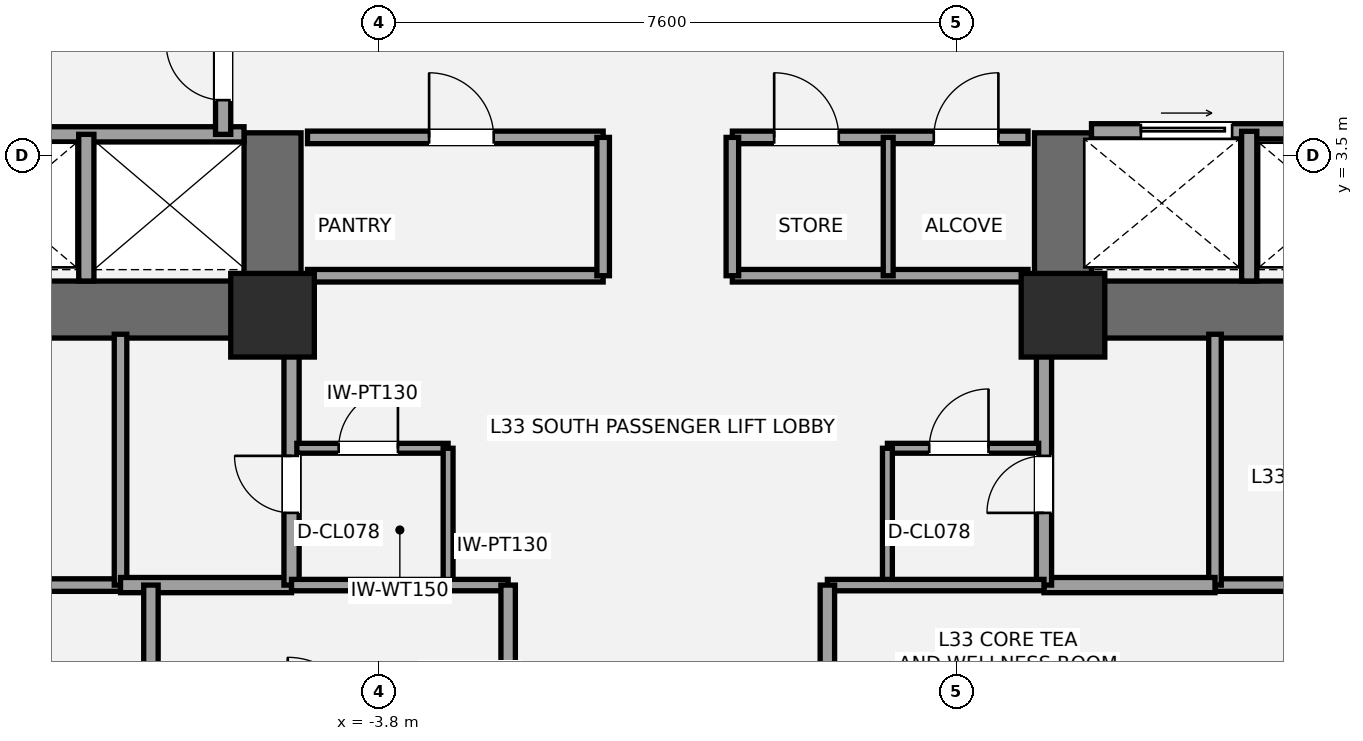
"""IFC4 building model, lengths in metres.
Left out: names, types, materials, properties, quantities, classifications, styles, units other than length and angle.
Written with IfcOpenShell. Run it as: python <this file> out.ifc"""

import sys

from ifc_helpers import new_model, si_unit, direction, frame, frame_2d, origin, origin_2d, place, context, subcontext, project, spatial, rectangle, extrude, element, fill, save


model = new_model("IFC4")
c1 = context("Model", 3, precision=1e-05, world=origin(), true_north=direction((0.0, 1.0)))
c2 = subcontext(c1, "Body", "Model", "MODEL_VIEW")
j1 = project(units=[si_unit("LENGTHUNIT", "METRE"), si_unit("PLANEANGLEUNIT", "RADIAN")], contexts=[c1])
p1 = place(None, origin())
s1 = spatial("IfcSite", under=j1, at=p1, CompositionType="ELEMENT")
p2 = place(p1, origin())
s2 = spatial("IfcBuilding", under=s1, at=p2, CompositionType="ELEMENT")
p3 = place(p2, frame((0.0, 0.0, 124.6)))
s3 = spatial("IfcBuildingStorey", under=s2, at=p3, CompositionType="ELEMENT", Elevation=124.6)
p4 = place(p3, frame((-4.825, 1.475, 0.0), z_axis=(0.0, 0.0, 1.0), x_axis=(-1.0, 0.0, 0.0)))
e1 = element("IfcWall", 1, at=p4, inside=s3, PredefinedType="SHEAR", context=c2, shape_type="SweptSolid", body=[
    extrude(rectangle(XDim=9.075, YDim=0.75, at=frame_2d((4.538, 0.0))), origin(), (0.0, 0.0, 1.0), 3.5),
])
p5 = place(p4, frame((5.475, 0.0, 0.0)))
e2 = element("IfcOpeningElement", 2, at=p5, cuts=e1, PredefinedType="OPENING", context=c2, shape_type="SweptSolid", body=[
    extrude(rectangle(XDim=1.05, YDim=2.15, at=frame_2d((0.525, 1.075))), frame((0.0, 0.385, 0.0), z_axis=(0.0, -1.0, 0.0), x_axis=(1.0, 0.0, 0.0)), (0.0, 0.0, 1.0), 0.77),
])
p6 = place(p4, frame((3.805, 0.0, 0.0)))
e3 = element("IfcOpeningElement", 3, at=p6, cuts=e1, PredefinedType="OPENING", context=c2, shape_type="SweptSolid", body=[
    extrude(rectangle(XDim=1.1, YDim=2.2, at=frame_2d((0.55, 1.1))), frame((0.0, 0.385, 0.0), z_axis=(0.0, -1.0, 0.0), x_axis=(1.0, 0.0, 0.0)), (0.0, 0.0, 1.0), 0.77),
])
p7 = place(p3, frame((-5.2, 1.1, 0.0), z_axis=(0.0, 0.0, 1.0), x_axis=(0.0, 1.0, 0.0)))
e4 = element("IfcWall", 4, at=p7, inside=s3, PredefinedType="SHEAR", context=c2, shape_type="SweptSolid", body=[
    extrude(rectangle(XDim=2.7, YDim=0.75, at=frame_2d((1.35, 0.0))), origin(), (0.0, 0.0, 1.0), 3.5),
])
p8 = place(p3, frame((13.9, 1.475, 0.0), z_axis=(0.0, 0.0, 1.0), x_axis=(-1.0, 0.0, 0.0)))
e5 = element("IfcWall", 5, at=p8, inside=s3, PredefinedType="SHEAR", context=c2, shape_type="SweptSolid", body=[
    extrude(rectangle(XDim=9.075, YDim=0.75, at=frame_2d((4.538, 0.0))), origin(), (0.0, 0.0, 1.0), 3.5),
])
p9 = place(p8, frame((2.55, 0.0, 0.0)))
e6 = element("IfcOpeningElement", 6, at=p9, cuts=e5, PredefinedType="OPENING", context=c2, shape_type="SweptSolid", body=[
    extrude(rectangle(XDim=1.05, YDim=2.15, at=frame_2d((0.525, 1.075))), frame((0.0, 0.385, 0.0), z_axis=(0.0, -1.0, 0.0), x_axis=(1.0, 0.0, 0.0)), (0.0, 0.0, 1.0), 0.77),
])
p10 = place(p8, frame((4.55, 0.0, 0.0)))
e7 = element("IfcOpeningElement", 7, at=p10, cuts=e5, PredefinedType="OPENING", context=c2, shape_type="SweptSolid", body=[
    extrude(rectangle(XDim=1.1, YDim=2.2, at=frame_2d((0.55, 1.1))), frame((0.0, 0.385, 0.0), z_axis=(0.0, -1.0, 0.0), x_axis=(1.0, 0.0, 0.0)), (0.0, 0.0, 1.0), 0.77),
])
p11 = place(p3, frame((5.2, 1.1, 0.0), z_axis=(0.0, 0.0, 1.0), x_axis=(0.0, 1.0, 0.0)))
e8 = element("IfcWall", 8, at=p11, inside=s3, PredefinedType="SHEAR", context=c2, shape_type="SweptSolid", body=[
    extrude(rectangle(XDim=2.7, YDim=0.75, at=frame_2d((1.35, 0.0))), origin(), (0.0, 0.0, 1.0), 3.5),
])
for number, where, z_axis, x_axis in (
    (9, (-5.2, 1.4, 0.0), (0.0, 0.0, 1.0), (1.0, 0.0, 0.0)),
    (10, (5.2, 1.4, 0.0), (0.0, 0.0, 1.0), (1.0, 0.0, 0.0)),
):
    element("IfcColumn", number, at=place(p3, frame(where, z_axis=z_axis, x_axis=x_axis)), inside=s3, PredefinedType="COLUMN", context=c2, shape_type="SweptSolid", body=[
        extrude(rectangle(XDim=1.1, YDim=1.1, at=origin_2d()), origin(), (0.0, 0.0, 1.0), 3.5),
    ])
p12 = place(p3, frame((-13.45, -2.15, 0.0), z_axis=(0.0, 0.0, 1.0), x_axis=(1.0, 0.0, 0.0)))
e11 = element("IfcWall", 11, at=p12, inside=s3, PredefinedType="PARTITIONING", context=c2, shape_type="SweptSolid", body=[
    extrude(rectangle(XDim=6.25, YDim=0.165, at=frame_2d((3.125, 0.0))), origin(), (0.0, 0.0, 1.0), 3.31),
])
p13 = place(p3, frame((-7.2, -2.15, 0.0), z_axis=(0.0, 0.0, 1.0), x_axis=(0.0, 1.0, 0.0)))
e12 = element("IfcWall", 12, at=p13, inside=s3, PredefinedType="PARTITIONING", context=c2, shape_type="SweptSolid", body=[
    extrude(rectangle(XDim=3.3, YDim=0.165, at=frame_2d((1.65, 0.0))), origin(), (0.0, 0.0, 1.0), 2.763),
])
p14 = place(p3, frame((-7.2, -2.15, 0.0), z_axis=(0.0, 0.0, 1.0), x_axis=(1.0, 0.0, 0.0)))
e13 = element("IfcWall", 13, at=p14, inside=s3, PredefinedType="SOLIDWALL", context=c2, shape_type="SweptSolid", body=[
    extrude(rectangle(XDim=2.25, YDim=0.2, at=frame_2d((1.125, 0.0))), origin(), (0.0, 0.0, 1.0), 2.763),
])
p15 = place(p3, frame((-4.95, -2.15, 0.0), z_axis=(0.0, 0.0, 1.0), x_axis=(0.0, 1.0, 0.0)))
e14 = element("IfcWall", 14, at=p15, inside=s3, PredefinedType="SOLIDWALL", context=c2, shape_type="SweptSolid", body=[
    extrude(rectangle(XDim=3.3, YDim=0.2, at=frame_2d((1.65, 0.0))), origin(), (0.0, 0.0, 1.0), 2.763),
])
p16 = place(p15, frame((0.95, 0.0, 0.0)))
e15 = element("IfcOpeningElement", 15, at=p16, cuts=e14, PredefinedType="OPENING", context=c2, shape_type="SweptSolid", body=[
    extrude(rectangle(XDim=0.75, YDim=2.1, at=frame_2d((0.375, 1.05))), frame((0.0, 0.11, 0.0), z_axis=(0.0, -1.0, 0.0), x_axis=(1.0, 0.0, 0.0)), (0.0, 0.0, 1.0), 0.22),
])
p17 = place(p3, frame((7.2, -2.15, 0.0), z_axis=(0.0, 0.0, 1.0), x_axis=(1.0, 0.0, 0.0)))
e16 = element("IfcWall", 16, at=p17, inside=s3, PredefinedType="PARTITIONING", context=c2, shape_type="SweptSolid", body=[
    extrude(rectangle(XDim=6.25, YDim=0.165, at=frame_2d((3.125, 0.0))), origin(), (0.0, 0.0, 1.0), 3.31),
])
p18 = place(p3, frame((7.2, -2.15, 0.0), z_axis=(0.0, 0.0, 1.0), x_axis=(0.0, 1.0, 0.0)))
e17 = element("IfcWall", 17, at=p18, inside=s3, PredefinedType="PARTITIONING", context=c2, shape_type="SweptSolid", body=[
    extrude(rectangle(XDim=3.3, YDim=0.165, at=frame_2d((1.65, 0.0))), origin(), (0.0, 0.0, 1.0), 2.763),
])
p19 = place(p3, frame((4.95, -2.15, 0.0), z_axis=(0.0, 0.0, 1.0), x_axis=(1.0, 0.0, 0.0)))
e18 = element("IfcWall", 18, at=p19, inside=s3, PredefinedType="SOLIDWALL", context=c2, shape_type="SweptSolid", body=[
    extrude(rectangle(XDim=2.25, YDim=0.2, at=frame_2d((1.125, 0.0))), origin(), (0.0, 0.0, 1.0), 3.31),
])
p20 = place(p3, frame((4.95, -2.15, 0.0), z_axis=(0.0, 0.0, 1.0), x_axis=(0.0, 1.0, 0.0)))
e19 = element("IfcWall", 19, at=p20, inside=s3, PredefinedType="SOLIDWALL", context=c2, shape_type="SweptSolid", body=[
    extrude(rectangle(XDim=3.3, YDim=0.2, at=frame_2d((1.65, 0.0))), origin(), (0.0, 0.0, 1.0), 2.763),
])
p21 = place(p20, frame((0.95, 0.0, 0.0)))
e20 = element("IfcOpeningElement", 20, at=p21, cuts=e19, PredefinedType="OPENING", context=c2, shape_type="SweptSolid", body=[
    extrude(rectangle(XDim=0.75, YDim=2.1, at=frame_2d((0.375, 1.05))), frame((0.0, 0.11, 0.0), z_axis=(0.0, -1.0, 0.0), x_axis=(1.0, 0.0, 0.0)), (0.0, 0.0, 1.0), 0.22),
])
p22 = place(p3, frame((-4.88, -0.35, 0.0), z_axis=(0.0, 0.0, 1.0), x_axis=(1.0, 0.0, 0.0)))
e21 = element("IfcWall", 21, at=p22, inside=s3, PredefinedType="PARTITIONING", context=c2, shape_type="SweptSolid", body=[
    extrude(rectangle(XDim=1.99, YDim=0.13, at=frame_2d((0.995, 0.0))), origin(), (0.0, 0.0, 1.0), 3.31),
])
p23 = place(p22, frame((0.55, 0.0, 0.0)))
e22 = element("IfcOpeningElement", 22, at=p23, cuts=e21, PredefinedType="OPENING", context=c2, shape_type="SweptSolid", body=[
    extrude(rectangle(XDim=0.78, YDim=2.1, at=frame_2d((0.39, 1.05))), frame((0.0, 0.075, 0.0), z_axis=(0.0, -1.0, 0.0), x_axis=(1.0, 0.0, 0.0)), (0.0, 0.0, 1.0), 0.15),
])
p24 = place(p3, frame((-2.89, -2.15, 0.0), z_axis=(0.0, 0.0, 1.0), x_axis=(0.0, 1.0, 0.0)))
e23 = element("IfcWall", 23, at=p24, inside=s3, PredefinedType="PARTITIONING", context=c2, shape_type="SweptSolid", body=[
    extrude(rectangle(XDim=1.8, YDim=0.13, at=frame_2d((0.9, 0.0))), origin(), (0.0, 0.0, 1.0), 2.763),
])
p25 = place(p3, frame((2.89, -0.35, 0.0), z_axis=(0.0, 0.0, 1.0), x_axis=(1.0, 0.0, 0.0)))
e24 = element("IfcWall", 24, at=p25, inside=s3, PredefinedType="PARTITIONING", context=c2, shape_type="SweptSolid", body=[
    extrude(rectangle(XDim=1.99, YDim=0.13, at=frame_2d((0.995, 0.0))), origin(), (0.0, 0.0, 1.0), 3.31),
])
p26 = place(p25, frame((0.55, 0.0, 0.0)))
e25 = element("IfcOpeningElement", 25, at=p26, cuts=e24, PredefinedType="OPENING", context=c2, shape_type="SweptSolid", body=[
    extrude(rectangle(XDim=0.78, YDim=2.1, at=frame_2d((0.39, 1.05))), frame((0.0, 0.075, 0.0), z_axis=(0.0, -1.0, 0.0), x_axis=(1.0, 0.0, 0.0)), (0.0, 0.0, 1.0), 0.15),
])
p27 = place(p3, frame((2.89, -2.15, 0.0), z_axis=(0.0, 0.0, 1.0), x_axis=(0.0, 1.0, 0.0)))
e26 = element("IfcWall", 26, at=p27, inside=s3, PredefinedType="PARTITIONING", context=c2, shape_type="SweptSolid", body=[
    extrude(rectangle(XDim=1.8, YDim=0.13, at=frame_2d((0.9, 0.0))), origin(), (0.0, 0.0, 1.0), 3.31),
])
p28 = place(p3, frame((-9.78, 3.78, 0.0), z_axis=(0.0, 0.0, 1.0), x_axis=(1.0, 0.0, 0.0)))
e27 = element("IfcWall", 27, at=p28, inside=s3, PredefinedType="SOLIDWALL", context=c2, shape_type="SweptSolid", body=[
    extrude(rectangle(XDim=4.205, YDim=0.2, at=frame_2d((2.103, 0.0))), origin(), (0.0, 0.0, 1.0), 3.31),
])
p29 = place(p3, frame((-7.65, 1.85, 0.0), z_axis=(0.0, 0.0, 1.0), x_axis=(0.0, 1.0, 0.0)))
e28 = element("IfcWall", 28, at=p29, inside=s3, PredefinedType="SOLIDWALL", context=c2, shape_type="SweptSolid", body=[
    extrude(rectangle(XDim=1.93, YDim=0.2, at=frame_2d((0.965, 0.0))), origin(), (0.0, 0.0, 1.0), 3.31),
])
p30 = place(p3, frame((-5.85, 3.78, 0.0), z_axis=(0.0, 0.0, 1.0), x_axis=(0.0, 1.0, 0.0)))
e29 = element("IfcWall", 29, at=p30, inside=s3, PredefinedType="SOLIDWALL", context=c2, shape_type="SweptSolid", body=[
    extrude(rectangle(XDim=1.69, YDim=0.2, at=frame_2d((0.845, 0.0))), origin(), (0.0, 0.0, 1.0), 3.31),
])
p31 = place(p30, frame((0.45, 0.0, 0.0)))
e30 = element("IfcOpeningElement", 30, at=p31, cuts=e29, PredefinedType="OPENING", context=c2, shape_type="SweptSolid", body=[
    extrude(rectangle(XDim=0.75, YDim=2.1, at=frame_2d((0.375, 1.05))), frame((0.0, 0.11, 0.0), z_axis=(0.0, -1.0, 0.0), x_axis=(1.0, 0.0, 0.0)), (0.0, 0.0, 1.0), 0.22),
])
p32 = place(p3, frame((5.575, 3.82, 0.0), z_axis=(0.0, 0.0, 1.0), x_axis=(1.0, 0.0, 0.0)))
e31 = element("IfcWall", 31, at=p32, inside=s3, PredefinedType="SOLIDWALL", context=c2, shape_type="SweptSolid", body=[
    extrude(rectangle(XDim=4.205, YDim=0.2, at=frame_2d((2.103, 0.0))), origin(), (0.0, 0.0, 1.0), 3.31),
])
p33 = place(p32, frame((0.65, 0.0, 0.0)))
e32 = element("IfcOpeningElement", 32, at=p33, cuts=e31, PredefinedType="OPENING", context=c2, shape_type="SweptSolid", body=[
    extrude(rectangle(XDim=1.2, YDim=2.2, at=frame_2d((0.6, 1.1))), frame((0.0, 0.11, 0.0), z_axis=(0.0, -1.0, 0.0), x_axis=(1.0, 0.0, 0.0)), (0.0, 0.0, 1.0), 0.22),
])
p34 = place(p3, frame((7.65, 1.85, 0.0), z_axis=(0.0, 0.0, 1.0), x_axis=(0.0, 1.0, 0.0)))
e33 = element("IfcWall", 33, at=p34, inside=s3, PredefinedType="SOLIDWALL", context=c2, shape_type="SweptSolid", body=[
    extrude(rectangle(XDim=1.97, YDim=0.2, at=frame_2d((0.985, 0.0))), origin(), (0.0, 0.0, 1.0), 3.31),
])
p35 = place(p3, frame((-4.74, 1.92, 0.0), z_axis=(0.0, 0.0, 1.0), x_axis=(1.0, 0.0, 0.0)))
e34 = element("IfcWall", 34, at=p35, inside=s3, PredefinedType="PARTITIONING", context=c2, shape_type="SweptSolid", body=[
    extrude(rectangle(XDim=3.89, YDim=0.165, at=frame_2d((1.945, 0.0))), origin(), (0.0, 0.0, 1.0), 2.3),
])
p36 = place(p3, frame((-4.74, 3.74, 0.0), z_axis=(0.0, 0.0, 1.0), x_axis=(1.0, 0.0, 0.0)))
e35 = element("IfcWall", 35, at=p36, inside=s3, PredefinedType="PARTITIONING", context=c2, shape_type="SweptSolid", body=[
    extrude(rectangle(XDim=3.89, YDim=0.165, at=frame_2d((1.945, 0.0))), origin(), (0.0, 0.0, 1.0), 3.31),
])
p37 = place(p36, frame((1.6, 0.0, 0.0)))
e36 = element("IfcOpeningElement", 36, at=p37, cuts=e35, PredefinedType="OPENING", context=c2, shape_type="SweptSolid", body=[
    extrude(rectangle(XDim=0.85, YDim=2.1, at=frame_2d((0.425, 1.05))), frame((0.0, 0.093, 0.0), z_axis=(0.0, -1.0, 0.0), x_axis=(1.0, 0.0, 0.0)), (0.0, 0.0, 1.0), 0.185),
])
p38 = place(p3, frame((-0.85, 1.92, 0.0), z_axis=(0.0, 0.0, 1.0), x_axis=(0.0, 1.0, 0.0)))
e37 = element("IfcWall", 37, at=p38, inside=s3, PredefinedType="PARTITIONING", context=c2, shape_type="SweptSolid", body=[
    extrude(rectangle(XDim=1.82, YDim=0.165, at=frame_2d((0.91, 0.0))), origin(), (0.0, 0.0, 1.0), 3.31),
])
p39 = place(p3, frame((0.85, 1.92, 0.0), z_axis=(0.0, 0.0, 1.0), x_axis=(1.0, 0.0, 0.0)))
e38 = element("IfcWall", 38, at=p39, inside=s3, PredefinedType="PARTITIONING", context=c2, shape_type="SweptSolid", body=[
    extrude(rectangle(XDim=3.89, YDim=0.165, at=frame_2d((1.945, 0.0))), origin(), (0.0, 0.0, 1.0), 2.3),
])
p40 = place(p3, frame((0.85, 3.74, 0.0), z_axis=(0.0, 0.0, 1.0), x_axis=(1.0, 0.0, 0.0)))
e39 = element("IfcWall", 39, at=p40, inside=s3, PredefinedType="PARTITIONING", context=c2, shape_type="SweptSolid", body=[
    extrude(rectangle(XDim=3.89, YDim=0.165, at=frame_2d((1.945, 0.0))), origin(), (0.0, 0.0, 1.0), 3.31),
])
p41 = place(p40, frame((0.55, 0.0, 0.0)))
e40 = element("IfcOpeningElement", 40, at=p41, cuts=e39, PredefinedType="OPENING", context=c2, shape_type="SweptSolid", body=[
    extrude(rectangle(XDim=0.85, YDim=2.1, at=frame_2d((0.425, 1.05))), frame((0.0, 0.093, 0.0), z_axis=(0.0, -1.0, 0.0), x_axis=(1.0, 0.0, 0.0)), (0.0, 0.0, 1.0), 0.185),
])
p42 = place(p40, frame((2.65, 0.0, 0.0)))
e41 = element("IfcOpeningElement", 41, at=p42, cuts=e39, PredefinedType="OPENING", context=c2, shape_type="SweptSolid", body=[
    extrude(rectangle(XDim=0.85, YDim=2.1, at=frame_2d((0.425, 1.05))), frame((0.0, 0.093, 0.0), z_axis=(0.0, -1.0, 0.0), x_axis=(1.0, 0.0, 0.0)), (0.0, 0.0, 1.0), 0.185),
])
p43 = place(p3, frame((0.85, 1.92, 0.0), z_axis=(0.0, 0.0, 1.0), x_axis=(0.0, 1.0, 0.0)))
e42 = element("IfcWall", 42, at=p43, inside=s3, PredefinedType="PARTITIONING", context=c2, shape_type="SweptSolid", body=[
    extrude(rectangle(XDim=1.82, YDim=0.165, at=frame_2d((0.91, 0.0))), origin(), (0.0, 0.0, 1.0), 3.31),
])
p44 = place(p3, frame((2.9, 1.92, 0.0), z_axis=(0.0, 0.0, 1.0), x_axis=(0.0, 1.0, 0.0)))
e43 = element("IfcWall", 43, at=p44, inside=s3, PredefinedType="PARTITIONING", context=c2, shape_type="SweptSolid", body=[
    extrude(rectangle(XDim=1.82, YDim=0.13, at=frame_2d((0.91, 0.0))), origin(), (0.0, 0.0, 1.0), 3.31),
])
p45 = place(p3, frame((-4.95, -2.15, 0.0), z_axis=(0.0, 0.0, 1.0), x_axis=(1.0, 0.0, 0.0)))
e44 = element("IfcWall", 44, at=p45, inside=s3, PredefinedType="PLUMBINGWALL", context=c2, shape_type="SweptSolid", body=[
    extrude(rectangle(XDim=2.85, YDim=0.15, at=frame_2d((1.425, 0.0))), origin(), (0.0, 0.0, 1.0), 2.763),
])
for number, where, z_axis, x_axis in (
    (45, (-6.8, -4.05, 0.0), (0.0, 0.0, 1.0), (0.0, 1.0, 0.0)),
    (46, (-2.1, -4.05, 0.0), (0.0, 0.0, 1.0), (0.0, 1.0, 0.0)),
):
    element("IfcWall", number, at=place(p3, frame(where, z_axis=z_axis, x_axis=x_axis)), inside=s3, PredefinedType="PLUMBINGWALL", context=c2, shape_type="SweptSolid", body=[
        extrude(rectangle(XDim=1.9, YDim=0.19, at=frame_2d((0.95, 0.0))), origin(), (0.0, 0.0, 1.0), 2.763),
    ])
p46 = place(p3, frame((2.1, -2.15, 0.0), z_axis=(0.0, 0.0, 1.0), x_axis=(1.0, 0.0, 0.0)))
e47 = element("IfcWall", 47, at=p46, inside=s3, PredefinedType="PLUMBINGWALL", context=c2, shape_type="SweptSolid", body=[
    extrude(rectangle(XDim=2.85, YDim=0.15, at=frame_2d((1.425, 0.0))), origin(), (0.0, 0.0, 1.0), 3.31),
])
p47 = place(p3, frame((2.1, -4.05, 0.0), z_axis=(0.0, 0.0, 1.0), x_axis=(0.0, 1.0, 0.0)))
e48 = element("IfcWall", 48, at=p47, inside=s3, PredefinedType="PLUMBINGWALL", context=c2, shape_type="SweptSolid", body=[
    extrude(rectangle(XDim=1.9, YDim=0.19, at=frame_2d((0.95, 0.0))), origin(), (0.0, 0.0, 1.0), 2.763),
])
p48 = place(p16, origin())
e49 = element("IfcDoor", 49, at=p48, inside=s3, OperationType="SINGLE_SWING_RIGHT", PredefinedType="DOOR", context=c2, shape_type="SweptSolid", body=[
    extrude(rectangle(XDim=0.75, YDim=2.1, at=frame_2d((0.375, 1.05))), frame((0.0, 0.025, 0.0), z_axis=(0.0, -1.0, 0.0), x_axis=(1.0, 0.0, 0.0)), (0.0, 0.0, 1.0), 0.05),
])
fill(e15, e49)
p49 = place(p21, origin())
e50 = element("IfcDoor", 50, at=p49, inside=s3, OperationType="SINGLE_SWING_LEFT", PredefinedType="DOOR", context=c2, shape_type="SweptSolid", body=[
    extrude(rectangle(XDim=0.75, YDim=2.1, at=frame_2d((0.375, 1.05))), frame((0.0, 0.025, 0.0), z_axis=(0.0, -1.0, 0.0), x_axis=(1.0, 0.0, 0.0)), (0.0, 0.0, 1.0), 0.05),
])
fill(e20, e50)
p50 = place(p23, origin())
e51 = element("IfcDoor", 51, at=p50, inside=s3, OperationType="SINGLE_SWING_RIGHT", PredefinedType="DOOR", context=c2, shape_type="SweptSolid", body=[
    extrude(rectangle(XDim=0.78, YDim=2.1, at=frame_2d((0.39, 1.05))), frame((0.0, 0.025, 0.0), z_axis=(0.0, -1.0, 0.0), x_axis=(1.0, 0.0, 0.0)), (0.0, 0.0, 1.0), 0.05),
])
fill(e22, e51)
p51 = place(p26, origin())
e52 = element("IfcDoor", 52, at=p51, inside=s3, OperationType="SINGLE_SWING_RIGHT", PredefinedType="DOOR", context=c2, shape_type="SweptSolid", body=[
    extrude(rectangle(XDim=0.78, YDim=2.1, at=frame_2d((0.39, 1.05))), frame((0.0, 0.025, 0.0), z_axis=(0.0, -1.0, 0.0), x_axis=(1.0, 0.0, 0.0)), (0.0, 0.0, 1.0), 0.05),
])
fill(e25, e52)
p52 = place(p31, origin())
e53 = element("IfcDoor", 53, at=p52, inside=s3, OperationType="SINGLE_SWING_RIGHT", PredefinedType="DOOR", context=c2, shape_type="SweptSolid", body=[
    extrude(rectangle(XDim=0.75, YDim=2.1, at=frame_2d((0.375, 1.05))), frame((0.0, 0.025, 0.0), z_axis=(0.0, -1.0, 0.0), x_axis=(1.0, 0.0, 0.0)), (0.0, 0.0, 1.0), 0.05),
])
fill(e30, e53)
p53 = place(p33, origin())
e54 = element("IfcDoor", 54, at=p53, inside=s3, OperationType="SLIDING_TO_RIGHT", PredefinedType="DOOR", context=c2, shape_type="SweptSolid", body=[
    extrude(rectangle(XDim=1.2, YDim=2.2, at=frame_2d((0.6, 1.1))), frame((0.0, 0.025, 0.0), z_axis=(0.0, -1.0, 0.0), x_axis=(1.0, 0.0, 0.0)), (0.0, 0.0, 1.0), 0.05),
])
fill(e32, e54)
p54 = place(p37, origin())
e55 = element("IfcDoor", 55, at=p54, inside=s3, OperationType="SINGLE_SWING_LEFT", PredefinedType="DOOR", context=c2, shape_type="SweptSolid", body=[
    extrude(rectangle(XDim=0.85, YDim=2.1, at=frame_2d((0.425, 1.05))), frame((0.0, 0.025, 0.0), z_axis=(0.0, -1.0, 0.0), x_axis=(1.0, 0.0, 0.0)), (0.0, 0.0, 1.0), 0.05),
])
fill(e36, e55)
p55 = place(p41, origin())
e56 = element("IfcDoor", 56, at=p55, inside=s3, OperationType="SINGLE_SWING_LEFT", PredefinedType="DOOR", context=c2, shape_type="SweptSolid", body=[
    extrude(rectangle(XDim=0.85, YDim=2.1, at=frame_2d((0.425, 1.05))), frame((0.0, 0.025, 0.0), z_axis=(0.0, -1.0, 0.0), x_axis=(1.0, 0.0, 0.0)), (0.0, 0.0, 1.0), 0.05),
])
fill(e40, e56)
p56 = place(p42, origin())
e57 = element("IfcDoor", 57, at=p56, inside=s3, OperationType="SINGLE_SWING_RIGHT", PredefinedType="DOOR", context=c2, shape_type="SweptSolid", body=[
    extrude(rectangle(XDim=0.85, YDim=2.1, at=frame_2d((0.425, 1.05))), frame((0.0, 0.025, 0.0), z_axis=(0.0, -1.0, 0.0), x_axis=(1.0, 0.0, 0.0)), (0.0, 0.0, 1.0), 0.05),
])
fill(e41, e57)
save(model, sys.argv[1])
